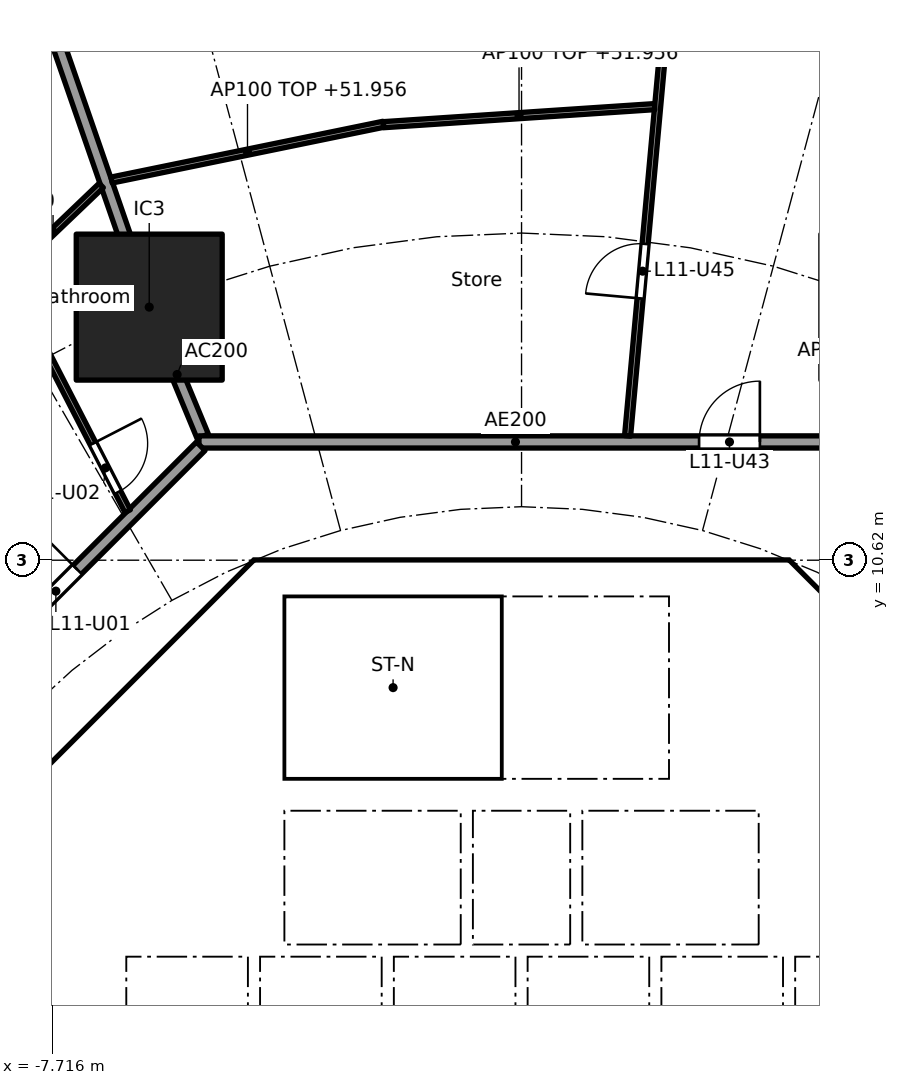
"""IFC4 building model, lengths in metres.
Left out: names, types, materials, properties, quantities, classifications, styles, units other than length and angle.
Written with IfcOpenShell. Run it as: python <this file> out.ifc"""

import sys

from ifc_helpers import new_model, si_unit, direction, frame, frame_2d, origin, origin_2d, place, context, subcontext, project, spatial, polyline, rectangle, outline, extrude, element, fill, save


model = new_model("IFC4")
c1 = context("Model", 3, precision=1e-05, world=origin(), true_north=direction((0.0, 1.0)))
c2 = subcontext(c1, "Body", "Model", "MODEL_VIEW")
j1 = project(units=[si_unit("LENGTHUNIT", "METRE"), si_unit("PLANEANGLEUNIT", "RADIAN")], contexts=[c1])
p1 = place(None, origin())
s1 = spatial("IfcSite", under=j1, at=p1, CompositionType="ELEMENT")
p2 = place(p1, origin())
s2 = spatial("IfcBuilding", under=s1, at=p2, CompositionType="ELEMENT")
p3 = place(p2, frame((0.0, 0.0, 49.2)))
s3 = spatial("IfcBuildingStorey", under=s2, at=p3, CompositionType="ELEMENT", Elevation=49.2)
p4 = place(p3, frame((-6.123, 14.782, 0.0), z_axis=(0.0, 0.0, 1.0), x_axis=(1.0, 0.0, 0.0)))
e1 = element("IfcColumn", 1, at=p4, inside=s3, PredefinedType="COLUMN", context=c2, shape_type="SweptSolid", body=[
    extrude(rectangle(XDim=2.4, YDim=2.4, at=origin_2d()), origin(), (0.0, 0.0, 1.0), 3.7),
])
p5 = place(p3, frame((9.988, 4.613, 0.0), z_axis=(0.0, 0.0, 1.0), x_axis=(-0.707106781187, 0.707106781187, 0.0)))
e2 = element("IfcWall", 2, at=p5, inside=s3, PredefinedType="SHEAR", context=c2, shape_type="SweptSolid", body=[
    extrude(rectangle(XDim=7.602, YDim=0.6, at=frame_2d((3.801, 0.0))), origin(), (0.0, 0.0, 1.0), 3.44),
])
p6 = place(p5, frame((3.201, 0.0, 0.0)))
e3 = element("IfcOpeningElement", 3, at=p6, cuts=e2, PredefinedType="OPENING", context=c2, shape_type="SweptSolid", body=[
    extrude(rectangle(XDim=1.2, YDim=2.1, at=frame_2d((0.6, 1.05))), frame((0.0, 0.31, 0.0), z_axis=(0.0, -1.0, 0.0), x_axis=(1.0, 0.0, 0.0)), (0.0, 0.0, 1.0), 0.62),
])
p7 = place(p3, frame((-4.613, 9.988, 0.0), z_axis=(0.0, 0.0, 1.0), x_axis=(-0.707106781187, -0.707106781187, 0.0)))
e4 = element("IfcWall", 4, at=p7, inside=s3, PredefinedType="SHEAR", context=c2, shape_type="SweptSolid", body=[
    extrude(rectangle(XDim=7.602, YDim=0.6, at=frame_2d((3.801, 0.0))), origin(), (0.0, 0.0, 1.0), 3.44),
])
p8 = place(p7, frame((0.351, 0.0, 0.0)))
e5 = element("IfcOpeningElement", 5, at=p8, cuts=e4, PredefinedType="OPENING", context=c2, shape_type="SweptSolid", body=[
    extrude(rectangle(XDim=1.1, YDim=2.1, at=frame_2d((0.55, 1.05))), frame((0.0, 0.31, 0.0), z_axis=(0.0, -1.0, 0.0), x_axis=(1.0, 0.0, 0.0)), (0.0, 0.0, 1.0), 0.62),
])
p9 = place(p3, frame((-5.8, 4.3, 0.0), z_axis=(0.0, 0.0, 1.0), x_axis=(0.0, 1.0, 0.0)))
e6 = element("IfcWall", 6, at=p9, inside=s3, PredefinedType="PARTITIONING", context=c2, shape_type="SweptSolid", body=[
    extrude(rectangle(XDim=3.927, YDim=0.15, at=frame_2d((1.963, 0.0))), origin(), (0.0, 0.0, 1.0), 3.44),
])
p10 = place(p9, frame((1.551, 0.0, 0.0)))
e7 = element("IfcOpeningElement", 7, at=p10, cuts=e6, PredefinedType="OPENING", context=c2, shape_type="SweptSolid", body=[
    extrude(rectangle(XDim=0.9, YDim=2.1, at=frame_2d((0.45, 1.05))), frame((0.0, 0.085, 0.0), z_axis=(0.0, -1.0, 0.0), x_axis=(1.0, 0.0, 0.0)), (0.0, 0.0, 1.0), 0.17),
])
p11 = place(p3, frame((4.0, 4.3, 0.0), z_axis=(0.0, 0.0, 1.0), x_axis=(0.0, 1.0, 0.0)))
e8 = element("IfcWall", 8, at=p11, inside=s3, PredefinedType="SOLIDWALL", context=c2, shape_type="SweptSolid", body=[
    extrude(rectangle(XDim=2.2, YDim=0.2, at=frame_2d((1.1, 0.0))), origin(), (0.0, 0.0, 1.0), 3.44),
])
p12 = place(p11, frame((0.55, 0.0, 0.0)))
e9 = element("IfcOpeningElement", 9, at=p12, cuts=e8, PredefinedType="OPENING", context=c2, shape_type="SweptSolid", body=[
    extrude(rectangle(XDim=1.1, YDim=2.1, at=frame_2d((0.55, 1.05))), frame((0.0, 0.11, 0.0), z_axis=(0.0, -1.0, 0.0), x_axis=(1.0, 0.0, 0.0)), (0.0, 0.0, 1.0), 0.22),
])
p13 = place(p3, frame((-4.0, 4.3, 0.0), z_axis=(0.0, 0.0, 1.0), x_axis=(0.0, 1.0, 0.0)))
e10 = element("IfcWall", 10, at=p13, inside=s3, PredefinedType="SOLIDWALL", context=c2, shape_type="SweptSolid", body=[
    extrude(rectangle(XDim=2.2, YDim=0.2, at=frame_2d((1.1, 0.0))), origin(), (0.0, 0.0, 1.0), 3.44),
])
p14 = place(p13, frame((0.55, 0.0, 0.0)))
e11 = element("IfcOpeningElement", 11, at=p14, cuts=e10, PredefinedType="OPENING", context=c2, shape_type="SweptSolid", body=[
    extrude(rectangle(XDim=1.1, YDim=2.1, at=frame_2d((0.55, 1.05))), frame((0.0, 0.11, 0.0), z_axis=(0.0, -1.0, 0.0), x_axis=(1.0, 0.0, 0.0)), (0.0, 0.0, 1.0), 0.22),
])
p15 = place(p3, frame((4.0, 7.025, 0.0), z_axis=(0.0, 0.0, 1.0), x_axis=(0.0, 1.0, 0.0)))
e12 = element("IfcWall", 12, at=p15, inside=s3, PredefinedType="SOLIDWALL", context=c2, shape_type="SweptSolid", body=[
    extrude(rectangle(XDim=3.0, YDim=0.2, at=frame_2d((1.5, 0.0))), origin(), (0.0, 0.0, 1.0), 3.44),
])
p16 = place(p15, frame((0.925, 0.0, 0.0)))
e13 = element("IfcOpeningElement", 13, at=p16, cuts=e12, PredefinedType="OPENING", context=c2, shape_type="SweptSolid", body=[
    extrude(rectangle(XDim=1.1, YDim=2.1, at=frame_2d((0.55, 1.05))), frame((0.0, 0.11, 0.0), z_axis=(0.0, -1.0, 0.0), x_axis=(1.0, 0.0, 0.0)), (0.0, 0.0, 1.0), 0.22),
])
p17 = place(p3, origin())
e14 = element("IfcWall", 14, at=p17, inside=s3, PredefinedType="SHEAR", context=c2, shape_type="SweptSolid", body=[
    extrude(outline(polyline([(-4.152, 10.025), (-4.401, 9.776), (-4.825, 10.2), (-4.401, 10.625), (4.401, 10.625), (4.825, 10.2), (4.401, 9.776), (4.152, 10.025), (-4.152, 10.025)])), origin(), (0.0, 0.0, 1.0), 3.44),
])
for number, where, z_axis, x_axis in (
    (15, (-0.9, 4.3, 0.0), (0.0, 0.0, 1.0), (0.0, 1.0, 0.0)),
    (16, (0.9, 4.3, 0.0), (0.0, 0.0, 1.0), (0.0, 1.0, 0.0)),
):
    element("IfcWall", number, at=place(p3, frame(where, z_axis=z_axis, x_axis=x_axis)), inside=s3, PredefinedType="SOLIDWALL", context=c2, shape_type="SweptSolid", body=[
        extrude(rectangle(XDim=2.2, YDim=0.2, at=frame_2d((1.1, 0.0))), origin(), (0.0, 0.0, 1.0), 3.44),
    ])
p18 = place(p3, origin())
e17 = element("IfcWall", 17, at=p18, inside=s3, PredefinedType="SOLIDWALL", context=c2, shape_type="SweptSolid", body=[
    extrude(outline(polyline([(-6.5, 2.1), (-6.7, 2.1), (-6.7, 4.3), (6.7, 4.3), (6.7, 2.1), (6.5, 2.1), (6.5, 4.1), (4.5, 4.1), (4.5, 2.1), (4.3, 2.1), (4.3, 4.1), (2.3, 4.1), (2.3, 2.1), (2.1, 2.1), (2.1, 4.1), (0.1, 4.1), (0.1, 2.1), (-0.1, 2.1), (-0.1, 4.1), (-2.1, 4.1), (-2.1, 2.1), (-2.3, 2.1), (-2.3, 4.1), (-4.3, 4.1), (-4.3, 2.1), (-4.5, 2.1), (-4.5, 4.1), (-6.5, 4.1), (-6.5, 2.1)])), origin(), (0.0, 0.0, 1.0), 3.44),
])
p19 = place(p3, frame((-10.025, 4.0, 0.0), z_axis=(0.0, 0.0, 1.0), x_axis=(1.0, 0.0, 0.0)))
e18 = element("IfcWall", 18, at=p19, inside=s3, PredefinedType="PARTITIONING", context=c2, shape_type="SweptSolid", body=[
    extrude(rectangle(XDim=3.325, YDim=0.2, at=frame_2d((1.662, 0.0))), origin(), (0.0, 0.0, 1.0), 3.44),
])
p20 = place(p3, origin())
e19 = element("IfcWall", 19, at=p20, inside=s3, PredefinedType="SOLIDWALL", context=c2, shape_type="SweptSolid", body=[
    extrude(outline(polyline([(-3.9, 7.025), (-4.1, 7.025), (-4.1, 10.025), (-3.9, 10.025), (-3.9, 7.025)])), origin(), (0.0, 0.0, 1.0), 3.44),
])
p21 = place(p3, origin())
e20 = element("IfcWall", 20, at=p21, inside=s3, PredefinedType="SOLIDWALL", context=c2, shape_type="SweptSolid", body=[
    extrude(outline(polyline([(4.1, 6.5), (-4.1, 6.5), (-4.1, 7.025), (4.1, 7.025), (4.1, 6.5)])), origin(), (0.0, 0.0, 1.0), 3.44),
])
p22 = place(p3, frame((-5.243, 12.657, 0.0), z_axis=(0.0, 0.0, 1.0), x_axis=(-0.382668627144, 0.923885664896, 0.0)))
e21 = element("IfcWall", 21, at=p22, inside=s3, PredefinedType="PARTITIONING", context=c2, shape_type="SweptSolid", body=[
    extrude(rectangle(XDim=2.2, YDim=0.2, at=frame_2d((1.1, 0.0))), origin(), (0.0, 0.0, 1.0), 3.44),
])
p23 = place(p3, frame((-6.139, 14.829, 0.0), z_axis=(0.0, 0.0, 1.0), x_axis=(-0.327178799566, 0.944962450637, 0.0)))
e22 = element("IfcWall", 22, at=p23, inside=s3, PredefinedType="PARTITIONING", context=c2, shape_type="SweptSolid", body=[
    extrude(rectangle(XDim=13.517, YDim=0.2, at=frame_2d((6.759, 0.0))), origin(), (0.0, 0.0, 1.0), 2.756),
])
p24 = place(p3, frame((5.104, 12.565, 0.0), z_axis=(0.0, 0.0, 1.0), x_axis=(-1.0, 0.0, 0.0)))
e23 = element("IfcWall", 23, at=p24, inside=s3, PredefinedType="PARTITIONING", context=c2, shape_type="SweptSolid", body=[
    extrude(rectangle(XDim=10.409, YDim=0.2, at=frame_2d((5.205, 0.0))), origin(), (0.0, 0.0, 1.0), 3.44),
])
p25 = place(p24, frame((1.185, 0.0, 0.0)))
e24 = element("IfcOpeningElement", 24, at=p25, cuts=e23, PredefinedType="OPENING", context=c2, shape_type="SweptSolid", body=[
    extrude(rectangle(XDim=1.0, YDim=2.1, at=frame_2d((0.5, 1.05))), frame((0.0, 0.11, 0.0), z_axis=(0.0, -1.0, 0.0), x_axis=(1.0, 0.0, 0.0)), (0.0, 0.0, 1.0), 0.22),
])
p26 = place(p3, frame((-5.275, 12.494, 0.0), z_axis=(0.0, 0.0, 1.0), x_axis=(-0.707106781187, -0.707106781187, 0.0)))
e25 = element("IfcWall", 25, at=p26, inside=s3, PredefinedType="PARTITIONING", context=c2, shape_type="SweptSolid", body=[
    extrude(rectangle(XDim=10.209, YDim=0.2, at=frame_2d((5.104, 0.0))), origin(), (0.0, 0.0, 1.0), 3.44),
])
p27 = place(p26, frame((2.87, 0.0, 0.0)))
e26 = element("IfcOpeningElement", 26, at=p27, cuts=e25, PredefinedType="OPENING", context=c2, shape_type="SweptSolid", body=[
    extrude(rectangle(XDim=1.0, YDim=2.1, at=frame_2d((0.5, 1.05))), frame((0.0, 0.11, 0.0), z_axis=(0.0, -1.0, 0.0), x_axis=(1.0, 0.0, 0.0)), (0.0, 0.0, 1.0), 0.22),
])
p28 = place(p3, frame((1.744, 12.664, 0.0), z_axis=(0.0, 0.0, 1.0), x_axis=(0.090893639596, 0.995860605849, 0.0)))
e27 = element("IfcWall", 27, at=p28, inside=s3, PredefinedType="PARTITIONING", context=c2, shape_type="SweptSolid", body=[
    extrude(rectangle(XDim=19.374, YDim=0.1, at=frame_2d((9.687, 0.0))), origin(), (0.0, 0.0, 1.0), 2.687),
])
p29 = place(p28, frame((2.27, 0.0, 0.0)))
e28 = element("IfcOpeningElement", 28, at=p29, cuts=e27, PredefinedType="OPENING", context=c2, shape_type="SweptSolid", body=[
    extrude(rectangle(XDim=0.9, YDim=2.1, at=frame_2d((0.45, 1.05))), frame((0.0, 0.06, 0.0), z_axis=(0.0, -1.0, 0.0), x_axis=(1.0, 0.0, 0.0)), (0.0, 0.0, 1.0), 0.12),
])
p30 = place(p28, frame((8.582, 0.0, 0.0)))
e29 = element("IfcOpeningElement", 29, at=p30, cuts=e27, PredefinedType="OPENING", context=c2, shape_type="SweptSolid", body=[
    extrude(rectangle(XDim=0.9, YDim=2.1, at=frame_2d((0.45, 1.05))), frame((0.0, 0.06, 0.0), z_axis=(0.0, -1.0, 0.0), x_axis=(1.0, 0.0, 0.0)), (0.0, 0.0, 1.0), 0.12),
])
p31 = place(p28, frame((15.548, 0.0, 0.0)))
e30 = element("IfcOpeningElement", 30, at=p31, cuts=e27, PredefinedType="OPENING", context=c2, shape_type="SweptSolid", body=[
    extrude(rectangle(XDim=0.9, YDim=2.1, at=frame_2d((0.45, 1.05))), frame((0.0, 0.06, 0.0), z_axis=(0.0, -1.0, 0.0), x_axis=(1.0, 0.0, 0.0)), (0.0, 0.0, 1.0), 0.12),
])
p32 = place(p3, frame((2.188, 18.079, 0.0), z_axis=(0.0, 0.0, 1.0), x_axis=(-0.997791437766, -0.066424744789, 0.0)))
e31 = element("IfcWall", 31, at=p32, inside=s3, PredefinedType="PARTITIONING", context=c2, shape_type="SweptSolid", body=[
    extrude(rectangle(XDim=4.469, YDim=0.1, at=frame_2d((2.235, 0.0))), origin(), (0.0, 0.0, 1.0), 2.756),
])
p33 = place(p3, frame((-2.272, 17.789, 0.0), z_axis=(0.0, 0.0, 1.0), x_axis=(-0.979595137747, -0.200981009307, 0.0)))
e32 = element("IfcWall", 32, at=p33, inside=s3, PredefinedType="PARTITIONING", context=c2, shape_type="SweptSolid", body=[
    extrude(rectangle(XDim=4.562, YDim=0.1, at=frame_2d((2.281, 0.0))), origin(), (0.0, 0.0, 1.0), 2.756),
])
p34 = place(p3, frame((-6.912, 16.782, 0.0), z_axis=(0.0, 0.0, 1.0), x_axis=(-0.722789289931, -0.691068478778, 0.0)))
e33 = element("IfcWall", 33, at=p34, inside=s3, PredefinedType="PARTITIONING", context=c2, shape_type="SweptSolid", body=[
    extrude(rectangle(XDim=2.194, YDim=0.1, at=frame_2d((1.097, 0.0))), origin(), (0.0, 0.0, 1.0), 3.44),
])
p35 = place(p3, frame((-6.477, 11.427, 0.0), z_axis=(0.0, 0.0, 1.0), x_axis=(-0.457464037982, 0.889228122561, 0.0)))
e34 = element("IfcWall", 34, at=p35, inside=s3, PredefinedType="PARTITIONING", context=c2, shape_type="SweptSolid", body=[
    extrude(rectangle(XDim=10.032, YDim=0.1, at=frame_2d((5.016, 0.0))), origin(), (0.0, 0.0, 1.0), 2.687),
])
p36 = place(p35, frame((0.35, 0.0, 0.0)))
e35 = element("IfcOpeningElement", 35, at=p36, cuts=e34, PredefinedType="OPENING", context=c2, shape_type="SweptSolid", body=[
    extrude(rectangle(XDim=0.9, YDim=2.1, at=frame_2d((0.45, 1.05))), frame((0.0, 0.06, 0.0), z_axis=(0.0, -1.0, 0.0), x_axis=(1.0, 0.0, 0.0)), (0.0, 0.0, 1.0), 0.12),
])
p37 = place(p35, frame((6.735, 0.0, 0.0)))
e36 = element("IfcOpeningElement", 36, at=p37, cuts=e34, PredefinedType="OPENING", context=c2, shape_type="SweptSolid", body=[
    extrude(rectangle(XDim=0.9, YDim=2.1, at=frame_2d((0.45, 1.05))), frame((0.0, 0.06, 0.0), z_axis=(0.0, -1.0, 0.0), x_axis=(1.0, 0.0, 0.0)), (0.0, 0.0, 1.0), 0.12),
])
p38 = place(p12, origin())
e37 = element("IfcDoor", 37, at=p38, inside=s3, OperationType="DOUBLE_DOOR_SLIDING", PredefinedType="DOOR", context=c2, shape_type="SweptSolid", body=[
    extrude(rectangle(XDim=1.1, YDim=2.1, at=frame_2d((0.55, 1.05))), frame((0.0, 0.025, 0.0), z_axis=(0.0, -1.0, 0.0), x_axis=(1.0, 0.0, 0.0)), (0.0, 0.0, 1.0), 0.05),
])
fill(e9, e37)
p39 = place(p14, origin())
e38 = element("IfcDoor", 38, at=p39, inside=s3, OperationType="DOUBLE_DOOR_SLIDING", PredefinedType="DOOR", context=c2, shape_type="SweptSolid", body=[
    extrude(rectangle(XDim=1.1, YDim=2.1, at=frame_2d((0.55, 1.05))), frame((0.0, 0.025, 0.0), z_axis=(0.0, -1.0, 0.0), x_axis=(1.0, 0.0, 0.0)), (0.0, 0.0, 1.0), 0.05),
])
fill(e11, e38)
p40 = place(p16, origin())
e39 = element("IfcDoor", 39, at=p40, inside=s3, OperationType="SINGLE_SWING_RIGHT", PredefinedType="DOOR", context=c2, shape_type="SweptSolid", body=[
    extrude(rectangle(XDim=1.1, YDim=2.1, at=frame_2d((0.55, 1.05))), frame((0.0, 0.025, 0.0), z_axis=(0.0, -1.0, 0.0), x_axis=(1.0, 0.0, 0.0)), (0.0, 0.0, 1.0), 0.05),
])
fill(e13, e39)
p41 = place(p10, origin())
e40 = element("IfcDoor", 40, at=p41, inside=s3, OperationType="SINGLE_SWING_LEFT", PredefinedType="DOOR", context=c2, shape_type="SweptSolid", body=[
    extrude(rectangle(XDim=0.9, YDim=2.1, at=frame_2d((0.45, 1.05))), frame((0.0, 0.025, 0.0), z_axis=(0.0, -1.0, 0.0), x_axis=(1.0, 0.0, 0.0)), (0.0, 0.0, 1.0), 0.05),
])
fill(e7, e40)
p42 = place(p8, origin())
e41 = element("IfcDoor", 41, at=p42, inside=s3, OperationType="SINGLE_SWING_RIGHT", PredefinedType="DOOR", context=c2, shape_type="SweptSolid", body=[
    extrude(rectangle(XDim=1.1, YDim=2.1, at=frame_2d((0.55, 1.05))), frame((0.0, 0.025, 0.0), z_axis=(0.0, -1.0, 0.0), x_axis=(1.0, 0.0, 0.0)), (0.0, 0.0, 1.0), 0.05),
])
fill(e5, e41)
p43 = place(p27, frame((1.0, 0.0, 0.0), x_axis=(-1.0, 0.0, 0.0)))
e42 = element("IfcDoor", 42, at=p43, inside=s3, OperationType="SINGLE_SWING_RIGHT", PredefinedType="DOOR", context=c2, shape_type="SweptSolid", body=[
    extrude(rectangle(XDim=1.0, YDim=2.1, at=frame_2d((0.5, 1.05))), frame((0.0, 0.025, 0.0), z_axis=(0.0, -1.0, 0.0), x_axis=(1.0, 0.0, 0.0)), (0.0, 0.0, 1.0), 0.05),
])
fill(e26, e42)
p44 = place(p36, frame((0.9, 0.0, 0.0), x_axis=(-1.0, 0.0, 0.0)))
e43 = element("IfcDoor", 43, at=p44, inside=s3, OperationType="SINGLE_SWING_LEFT", PredefinedType="DOOR", context=c2, shape_type="SweptSolid", body=[
    extrude(rectangle(XDim=0.9, YDim=2.1, at=frame_2d((0.45, 1.05))), frame((0.0, 0.025, 0.0), z_axis=(0.0, -1.0, 0.0), x_axis=(1.0, 0.0, 0.0)), (0.0, 0.0, 1.0), 0.05),
])
fill(e35, e43)
p45 = place(p25, frame((1.0, 0.0, 0.0), x_axis=(-1.0, 0.0, 0.0)))
e44 = element("IfcDoor", 44, at=p45, inside=s3, OperationType="SINGLE_SWING_RIGHT", PredefinedType="DOOR", context=c2, shape_type="SweptSolid", body=[
    extrude(rectangle(XDim=1.0, YDim=2.1, at=frame_2d((0.5, 1.05))), frame((0.0, 0.025, 0.0), z_axis=(0.0, -1.0, 0.0), x_axis=(1.0, 0.0, 0.0)), (0.0, 0.0, 1.0), 0.05),
])
fill(e24, e44)
p46 = place(p29, origin())
e45 = element("IfcDoor", 45, at=p46, inside=s3, OperationType="SINGLE_SWING_LEFT", PredefinedType="DOOR", context=c2, shape_type="SweptSolid", body=[
    extrude(rectangle(XDim=0.9, YDim=2.1, at=frame_2d((0.45, 1.05))), frame((0.0, 0.025, 0.0), z_axis=(0.0, -1.0, 0.0), x_axis=(1.0, 0.0, 0.0)), (0.0, 0.0, 1.0), 0.05),
])
fill(e28, e45)
save(model, sys.argv[1])
